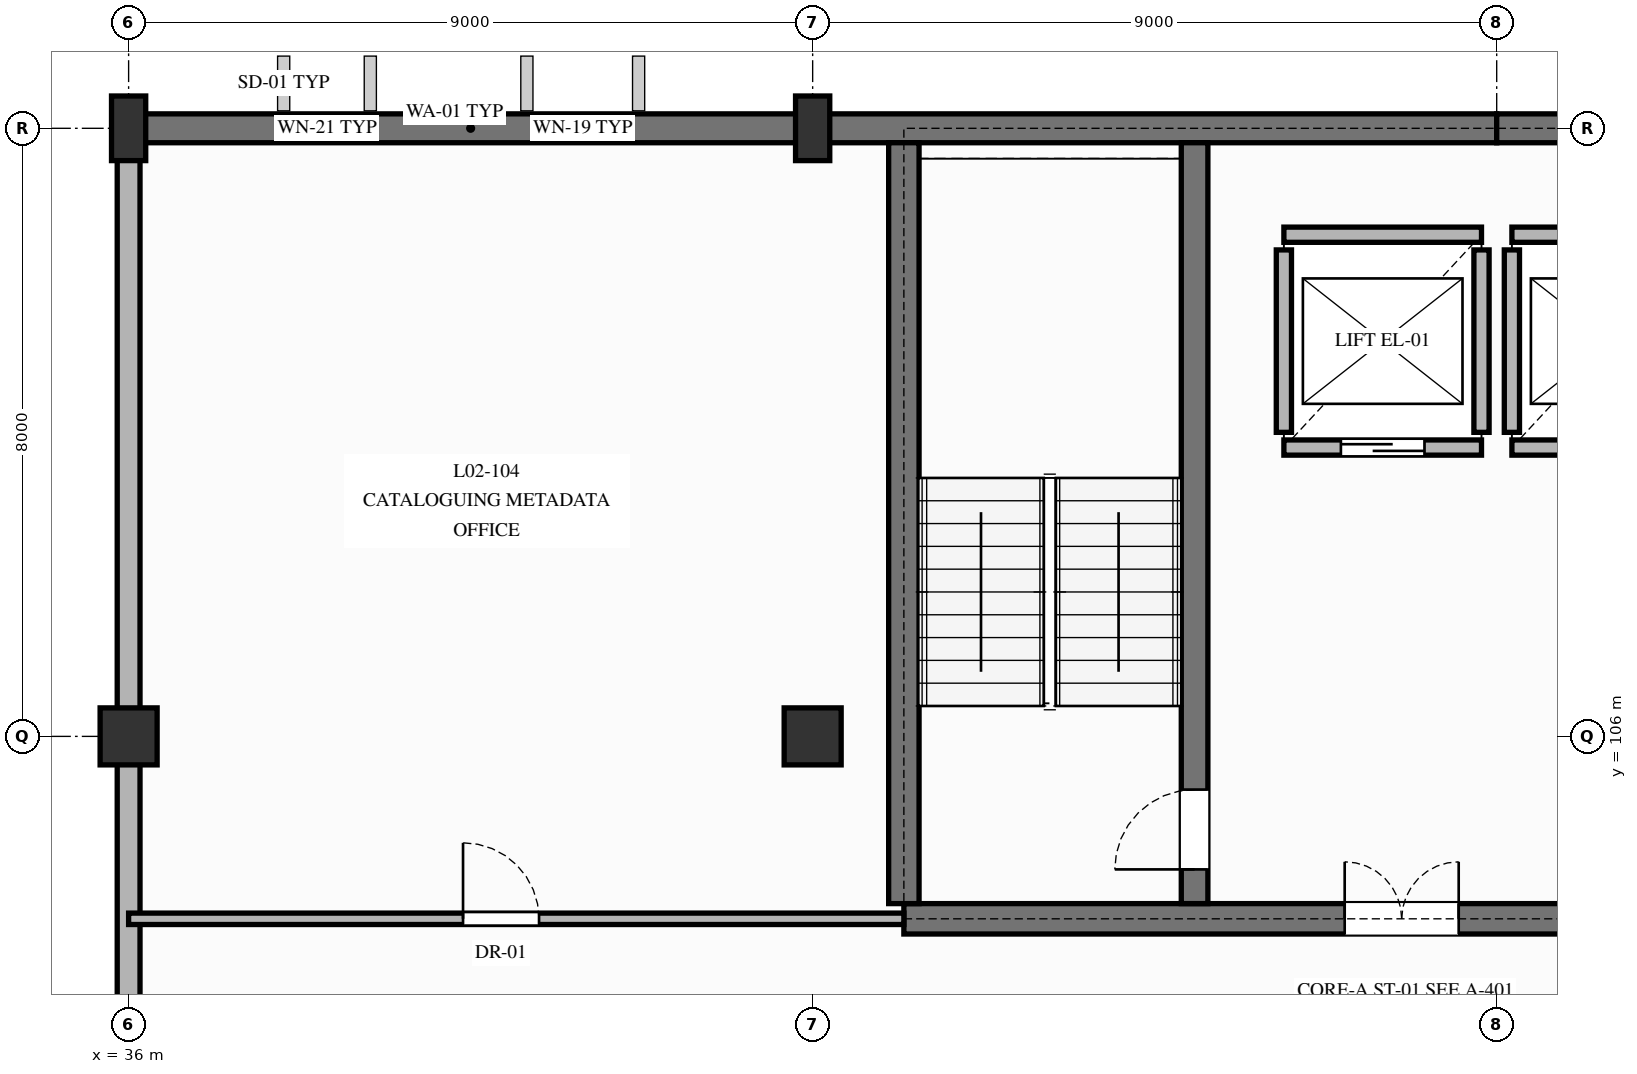
"""IFC4 building model, lengths in metres.
Left out: names, types, materials, properties, quantities, classifications, styles, units other than length and angle.
Written with IfcOpenShell. Run it as: python <this file> out.ifc"""

import sys

from ifc_helpers import new_model, si_unit, direction, frame, frame_2d, origin, origin_2d, place, context, subcontext, project, spatial, rectangle, extrude, element, fill, save


model = new_model("IFC4")
c1 = context("Model", 3, precision=1e-05, world=origin(), true_north=direction((0.0, 1.0)))
c2 = subcontext(c1, "Body", "Model", "MODEL_VIEW")
j1 = project(units=[si_unit("LENGTHUNIT", "METRE"), si_unit("PLANEANGLEUNIT", "RADIAN")], contexts=[c1])
p1 = place(None, origin())
s1 = spatial("IfcSite", under=j1, at=p1, CompositionType="ELEMENT")
p2 = place(p1, origin())
s2 = spatial("IfcBuilding", under=s1, at=p2, CompositionType="ELEMENT")
p3 = place(p2, frame((0.0, 0.0, 8.94)))
s3 = spatial("IfcBuildingStorey", under=s2, at=p3, CompositionType="ELEMENT", Elevation=8.94)
p4 = place(p3, frame((36.0, 106.0, 0.0), z_axis=(0.0, 0.0, 1.0), x_axis=(1.0, 0.0, 0.0)))
e1 = element("IfcColumn", 1, at=p4, inside=s3, PredefinedType="COLUMN", context=c2, shape_type="SweptSolid", body=[
    extrude(rectangle(XDim=0.75, YDim=0.75, at=origin_2d()), origin(), (0.0, 0.0, 1.0), 3.84),
])
p5 = place(p3, frame((36.0, 114.0, 0.0), z_axis=(0.0, 0.0, 1.0), x_axis=(0.0, 1.0, 0.0)))
e2 = element("IfcColumn", 2, at=p5, inside=s3, PredefinedType="COLUMN", context=c2, shape_type="SweptSolid", body=[
    extrude(rectangle(XDim=0.45, YDim=0.85, at=origin_2d()), origin(), (0.0, 0.0, 1.0), 3.84),
])
p6 = place(p3, frame((45.0, 106.0, 0.0), z_axis=(0.0, 0.0, 1.0), x_axis=(1.0, 0.0, 0.0)))
e3 = element("IfcColumn", 3, at=p6, inside=s3, PredefinedType="COLUMN", context=c2, shape_type="SweptSolid", body=[
    extrude(rectangle(XDim=0.75, YDim=0.75, at=origin_2d()), origin(), (0.0, 0.0, 1.0), 3.84),
])
p7 = place(p3, frame((45.0, 114.0, 0.0), z_axis=(0.0, 0.0, 1.0), x_axis=(0.0, 1.0, 0.0)))
e4 = element("IfcColumn", 4, at=p7, inside=s3, PredefinedType="COLUMN", context=c2, shape_type="SweptSolid", body=[
    extrude(rectangle(XDim=0.45, YDim=0.85, at=origin_2d()), origin(), (0.0, 0.0, 1.0), 3.84),
])
p8 = place(p3, frame((36.0, 114.0, 0.0), z_axis=(0.0, 0.0, 1.0), x_axis=(1.0, 0.0, 0.0)))
e5 = element("IfcWall", 5, at=p8, inside=s3, PredefinedType="SOLIDWALL", context=c2, shape_type="SweptSolid", body=[
    extrude(rectangle(XDim=9.0, YDim=0.38, at=frame_2d((4.5, 0.0))), origin(), (0.0, 0.0, 1.0), 3.53),
])
p9 = place(p8, frame((2.2, 0.0, 0.615)))
e6 = element("IfcOpeningElement", 6, at=p9, cuts=e5, PredefinedType="OPENING", context=c2, shape_type="SweptSolid", body=[
    extrude(rectangle(XDim=0.82, YDim=2.15, at=frame_2d((0.41, 1.075))), frame((0.0, 0.2, 0.0), z_axis=(0.0, -1.0, 0.0), x_axis=(1.0, 0.0, 0.0)), (0.0, 0.0, 1.0), 0.4),
])
p10 = place(p8, frame((5.4, 0.0, 0.465)))
e7 = element("IfcOpeningElement", 7, at=p10, cuts=e5, PredefinedType="OPENING", context=c2, shape_type="SweptSolid", body=[
    extrude(rectangle(XDim=1.15, YDim=2.3, at=frame_2d((0.575, 1.15))), frame((0.0, 0.2, 0.0), z_axis=(0.0, -1.0, 0.0), x_axis=(1.0, 0.0, 0.0)), (0.0, 0.0, 1.0), 0.4),
])
for number, where, z_axis, x_axis in (
    (8, (45.0, 114.0, 0.0), (0.0, 0.0, 1.0), (1.0, 0.0, 0.0)),
    (9, (54.0, 114.0, 0.0), (0.0, 0.0, 1.0), (1.0, 0.0, 0.0)),
):
    element("IfcWall", number, at=place(p3, frame(where, z_axis=z_axis, x_axis=x_axis)), inside=s3, PredefinedType="SOLIDWALL", context=c2, shape_type="SweptSolid", body=[
        extrude(rectangle(XDim=9.0, YDim=0.38, at=frame_2d((4.5, 0.0))), origin(), (0.0, 0.0, 1.0), 3.53),
    ])
p11 = place(p3, frame((36.0, 82.2, 0.0), z_axis=(0.0, 0.0, 1.0), x_axis=(0.0, 1.0, 0.0)))
e10 = element("IfcWall", 10, at=p11, inside=s3, PredefinedType="SOLIDWALL", context=c2, shape_type="SweptSolid", body=[
    extrude(rectangle(XDim=31.8, YDim=0.3, at=frame_2d((15.9, 0.0))), origin(), (0.0, 0.0, 1.0), 2.805),
])
p12 = place(p11, frame((3.0, 0.0, 0.835)))
e11 = element("IfcOpeningElement", 11, at=p12, cuts=e10, PredefinedType="OPENING", context=c2, shape_type="SweptSolid", body=[
    extrude(rectangle(XDim=1.35, YDim=1.85, at=frame_2d((0.675, 0.925))), frame((0.0, 0.16, 0.0), z_axis=(0.0, -1.0, 0.0), x_axis=(1.0, 0.0, 0.0)), (0.0, 0.0, 1.0), 0.32),
])
p13 = place(p11, frame((9.5, 0.0, 0.935)))
e12 = element("IfcOpeningElement", 12, at=p13, cuts=e10, PredefinedType="OPENING", context=c2, shape_type="SweptSolid", body=[
    extrude(rectangle(XDim=1.05, YDim=1.75, at=frame_2d((0.525, 0.875))), frame((0.0, 0.16, 0.0), z_axis=(0.0, -1.0, 0.0), x_axis=(1.0, 0.0, 0.0)), (0.0, 0.0, 1.0), 0.32),
])
p14 = place(p11, frame((16.5, 0.0, 0.585)))
e13 = element("IfcOpeningElement", 13, at=p14, cuts=e10, PredefinedType="OPENING", context=c2, shape_type="SweptSolid", body=[
    extrude(rectangle(XDim=1.5, YDim=2.1, at=frame_2d((0.75, 1.05))), frame((0.0, 0.16, 0.0), z_axis=(0.0, -1.0, 0.0), x_axis=(1.0, 0.0, 0.0)), (0.0, 0.0, 1.0), 0.32),
])
p15 = place(p3, frame((46.2, 103.6, 0.0), z_axis=(0.0, 0.0, 1.0), x_axis=(1.0, 0.0, 0.0)))
e14 = element("IfcWall", 14, at=p15, inside=s3, PredefinedType="SHEAR", context=c2, shape_type="SweptSolid", body=[
    extrude(rectangle(XDim=13.2, YDim=0.4, at=frame_2d((6.6, 0.0))), origin(), (0.0, 0.0, 1.0), 3.53),
])
p16 = place(p15, frame((5.8, 0.0, 0.0)))
e15 = element("IfcOpeningElement", 15, at=p16, cuts=e14, PredefinedType="OPENING", context=c2, shape_type="SweptSolid", body=[
    extrude(rectangle(XDim=1.5, YDim=2.2, at=frame_2d((0.75, 1.1))), frame((0.0, 0.21, 0.0), z_axis=(0.0, -1.0, 0.0), x_axis=(1.0, 0.0, 0.0)), (0.0, 0.0, 1.0), 0.42),
])
p17 = place(p3, frame((46.2, 103.8, 0.0), z_axis=(0.0, 0.0, 1.0), x_axis=(0.0, 1.0, 0.0)))
e16 = element("IfcWall", 16, at=p17, inside=s3, PredefinedType="SHEAR", context=c2, shape_type="SweptSolid", body=[
    extrude(rectangle(XDim=10.01, YDim=0.4, at=frame_2d((5.005, 0.0))), origin(), (0.0, 0.0, 1.0), 3.53),
])
p18 = place(p3, frame((50.025, 103.8, 0.0), z_axis=(0.0, 0.0, 1.0), x_axis=(0.0, 1.0, 0.0)))
e17 = element("IfcWall", 17, at=p18, inside=s3, PredefinedType="SHEAR", context=c2, shape_type="SweptSolid", body=[
    extrude(rectangle(XDim=10.01, YDim=0.35, at=frame_2d((5.005, 0.0))), origin(), (0.0, 0.0, 1.0), 3.53),
])
p19 = place(p18, frame((0.45, 0.0, 0.0)))
e18 = element("IfcOpeningElement", 18, at=p19, cuts=e17, PredefinedType="OPENING", context=c2, shape_type="SweptSolid", body=[
    extrude(rectangle(XDim=1.05, YDim=2.2, at=frame_2d((0.525, 1.1))), frame((0.0, 0.185, 0.0), z_axis=(0.0, -1.0, 0.0), x_axis=(1.0, 0.0, 0.0)), (0.0, 0.0, 1.0), 0.37),
])
p20 = place(p3, frame((51.2, 109.8, 0.0), z_axis=(0.0, 0.0, 1.0), x_axis=(1.0, 0.0, 0.0)))
e19 = element("IfcWall", 19, at=p20, inside=s3, PredefinedType="PARTITIONING", context=c2, shape_type="SweptSolid", body=[
    extrude(rectangle(XDim=2.6, YDim=0.2, at=frame_2d((1.3, 0.0))), origin(), (0.0, 0.0, 1.0), 3.53),
])
p21 = place(p20, frame((0.75, 0.0, 0.0)))
e20 = element("IfcOpeningElement", 20, at=p21, cuts=e19, PredefinedType="OPENING", context=c2, shape_type="SweptSolid", body=[
    extrude(rectangle(XDim=1.1, YDim=2.15, at=frame_2d((0.55, 1.075))), frame((0.0, 0.11, 0.0), z_axis=(0.0, -1.0, 0.0), x_axis=(1.0, 0.0, 0.0)), (0.0, 0.0, 1.0), 0.22),
])
p22 = place(p3, frame((51.2, 112.6, 0.0), z_axis=(0.0, 0.0, 1.0), x_axis=(1.0, 0.0, 0.0)))
e21 = element("IfcWall", 21, at=p22, inside=s3, PredefinedType="PARTITIONING", context=c2, shape_type="SweptSolid", body=[
    extrude(rectangle(XDim=2.6, YDim=0.2, at=frame_2d((1.3, 0.0))), origin(), (0.0, 0.0, 1.0), 3.53),
])
for number, where, z_axis, x_axis in (
    (22, (51.2, 110.0, 0.0), (0.0, 0.0, 1.0), (0.0, 1.0, 0.0)),
    (23, (53.8, 110.0, 0.0), (0.0, 0.0, 1.0), (0.0, 1.0, 0.0)),
):
    element("IfcWall", number, at=place(p3, frame(where, z_axis=z_axis, x_axis=x_axis)), inside=s3, PredefinedType="PARTITIONING", context=c2, shape_type="SweptSolid", body=[
        extrude(rectangle(XDim=2.4, YDim=0.2, at=frame_2d((1.2, 0.0))), origin(), (0.0, 0.0, 1.0), 3.53),
    ])
p23 = place(p3, frame((54.2, 109.8, 0.0), z_axis=(0.0, 0.0, 1.0), x_axis=(1.0, 0.0, 0.0)))
e24 = element("IfcWall", 24, at=p23, inside=s3, PredefinedType="PARTITIONING", context=c2, shape_type="SweptSolid", body=[
    extrude(rectangle(XDim=2.6, YDim=0.2, at=frame_2d((1.3, 0.0))), origin(), (0.0, 0.0, 1.0), 3.53),
])
p24 = place(p23, frame((0.75, 0.0, 0.0)))
e25 = element("IfcOpeningElement", 25, at=p24, cuts=e24, PredefinedType="OPENING", context=c2, shape_type="SweptSolid", body=[
    extrude(rectangle(XDim=1.1, YDim=2.15, at=frame_2d((0.55, 1.075))), frame((0.0, 0.11, 0.0), z_axis=(0.0, -1.0, 0.0), x_axis=(1.0, 0.0, 0.0)), (0.0, 0.0, 1.0), 0.22),
])
p25 = place(p3, frame((54.2, 112.6, 0.0), z_axis=(0.0, 0.0, 1.0), x_axis=(1.0, 0.0, 0.0)))
e26 = element("IfcWall", 26, at=p25, inside=s3, PredefinedType="PARTITIONING", context=c2, shape_type="SweptSolid", body=[
    extrude(rectangle(XDim=2.6, YDim=0.2, at=frame_2d((1.3, 0.0))), origin(), (0.0, 0.0, 1.0), 3.53),
])
p26 = place(p3, frame((54.2, 110.0, 0.0), z_axis=(0.0, 0.0, 1.0), x_axis=(0.0, 1.0, 0.0)))
e27 = element("IfcWall", 27, at=p26, inside=s3, PredefinedType="PARTITIONING", context=c2, shape_type="SweptSolid", body=[
    extrude(rectangle(XDim=2.4, YDim=0.2, at=frame_2d((1.2, 0.0))), origin(), (0.0, 0.0, 1.0), 3.53),
])
p27 = place(p3, frame((36.0, 103.6, 0.0), z_axis=(0.0, 0.0, 1.0), x_axis=(1.0, 0.0, 0.0)))
e28 = element("IfcWall", 28, at=p27, inside=s3, PredefinedType="PARTITIONING", context=c2, shape_type="SweptSolid", body=[
    extrude(rectangle(XDim=10.2, YDim=0.15, at=frame_2d((5.1, 0.0))), origin(), (0.0, 0.0, 1.0), 3.53),
])
p28 = place(p27, frame((4.4, 0.0, 0.0)))
e29 = element("IfcOpeningElement", 29, at=p28, cuts=e28, PredefinedType="OPENING", context=c2, shape_type="SweptSolid", body=[
    extrude(rectangle(XDim=1.0, YDim=2.15, at=frame_2d((0.5, 1.075))), frame((0.0, 0.085, 0.0), z_axis=(0.0, -1.0, 0.0), x_axis=(1.0, 0.0, 0.0)), (0.0, 0.0, 1.0), 0.17),
])
p29 = place(p9, origin())
e30 = element("IfcWindow", 30, at=p29, inside=s3, PartitioningType="SINGLE_PANEL", PredefinedType="WINDOW", context=c2, shape_type="SweptSolid", body=[
    extrude(rectangle(XDim=0.82, YDim=2.15, at=frame_2d((0.41, 1.075))), frame((0.0, 0.03, 0.0), z_axis=(0.0, -1.0, 0.0), x_axis=(1.0, 0.0, 0.0)), (0.0, 0.0, 1.0), 0.06),
])
fill(e6, e30)
p30 = place(p10, origin())
e31 = element("IfcWindow", 31, at=p30, inside=s3, PartitioningType="SINGLE_PANEL", PredefinedType="WINDOW", context=c2, shape_type="SweptSolid", body=[
    extrude(rectangle(XDim=1.15, YDim=2.3, at=frame_2d((0.575, 1.15))), frame((0.0, 0.03, 0.0), z_axis=(0.0, -1.0, 0.0), x_axis=(1.0, 0.0, 0.0)), (0.0, 0.0, 1.0), 0.06),
])
fill(e7, e31)
p31 = place(p16, origin())
e32 = element("IfcDoor", 32, at=p31, inside=s3, OperationType="DOUBLE_DOOR_SINGLE_SWING", PredefinedType="DOOR", context=c2, shape_type="SweptSolid", body=[
    extrude(rectangle(XDim=1.5, YDim=2.2, at=frame_2d((0.75, 1.1))), frame((0.0, 0.025, 0.0), z_axis=(0.0, -1.0, 0.0), x_axis=(1.0, 0.0, 0.0)), (0.0, 0.0, 1.0), 0.05),
])
fill(e15, e32)
p32 = place(p19, origin())
e33 = element("IfcDoor", 33, at=p32, inside=s3, OperationType="SINGLE_SWING_LEFT", PredefinedType="DOOR", context=c2, shape_type="SweptSolid", body=[
    extrude(rectangle(XDim=1.05, YDim=2.2, at=frame_2d((0.525, 1.1))), frame((0.0, 0.025, 0.0), z_axis=(0.0, -1.0, 0.0), x_axis=(1.0, 0.0, 0.0)), (0.0, 0.0, 1.0), 0.05),
])
fill(e18, e33)
p33 = place(p21, origin())
e34 = element("IfcDoor", 34, at=p33, inside=s3, OperationType="SLIDING_TO_LEFT", PredefinedType="DOOR", context=c2, shape_type="SweptSolid", body=[
    extrude(rectangle(XDim=1.1, YDim=2.15, at=frame_2d((0.55, 1.075))), frame((0.0, 0.025, 0.0), z_axis=(0.0, -1.0, 0.0), x_axis=(1.0, 0.0, 0.0)), (0.0, 0.0, 1.0), 0.05),
])
fill(e20, e34)
p34 = place(p28, origin())
e35 = element("IfcDoor", 35, at=p34, inside=s3, OperationType="SINGLE_SWING_LEFT", PredefinedType="DOOR", context=c2, shape_type="SweptSolid", body=[
    extrude(rectangle(XDim=1.0, YDim=2.15, at=frame_2d((0.5, 1.075))), frame((0.0, 0.025, 0.0), z_axis=(0.0, -1.0, 0.0), x_axis=(1.0, 0.0, 0.0)), (0.0, 0.0, 1.0), 0.05),
])
fill(e29, e35)
save(model, sys.argv[1])
